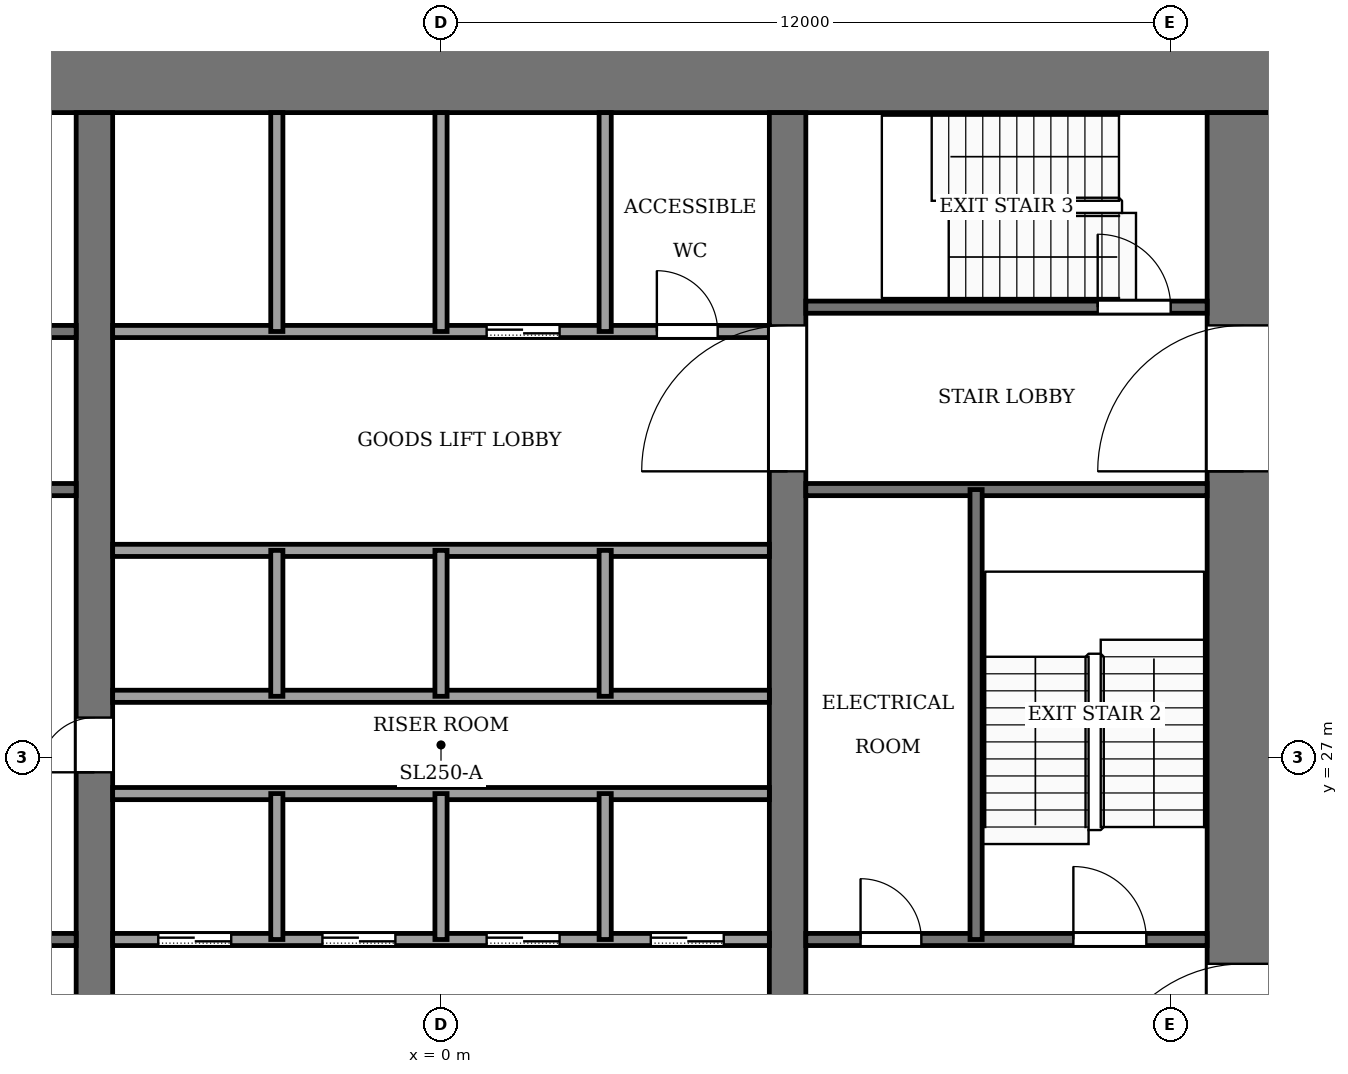
"""IFC4 building model, lengths in metres.
Left out: names, types, materials, properties, quantities, classifications, styles, units other than length and angle.
Written with IfcOpenShell. Run it as: python <this file> out.ifc"""

import sys

from ifc_helpers import new_model, si_unit, direction, frame, frame_2d, origin, place, context, subcontext, project, spatial, rectangle, extrude, element, fill, save


model = new_model("IFC4")
c1 = context("Model", 3, precision=1e-05, world=origin(), true_north=direction((0.0, 1.0)))
c2 = subcontext(c1, "Body", "Model", "MODEL_VIEW")
j1 = project(units=[si_unit("LENGTHUNIT", "METRE"), si_unit("PLANEANGLEUNIT", "RADIAN")], contexts=[c1])
p1 = place(None, origin())
s1 = spatial("IfcSite", under=j1, at=p1, CompositionType="ELEMENT")
p2 = place(p1, origin())
s2 = spatial("IfcBuilding", under=s1, at=p2, CompositionType="ELEMENT")
p3 = place(p2, frame((0.0, 0.0, 82.0)))
s3 = spatial("IfcBuildingStorey", under=s2, at=p3, CompositionType="ELEMENT", Elevation=82.0)
p4 = place(p3, frame((-13.8, 38.2, -0.13), z_axis=(0.0, 0.0, 1.0), x_axis=(1.0, 0.0, 0.0)))
e1 = element("IfcWall", 1, at=p4, inside=s3, PredefinedType="SHEAR", context=c2, shape_type="SweptSolid", body=[
    extrude(rectangle(XDim=27.6, YDim=1.2, at=frame_2d((13.8, 0.0))), origin(), (0.0, 0.0, 1.0), 4.0),
])
p5 = place(p3, frame((13.2, 18.4, -0.13), z_axis=(0.0, 0.0, 1.0), x_axis=(0.0, 1.0, 0.0)))
e2 = element("IfcWall", 2, at=p5, inside=s3, PredefinedType="SHEAR", context=c2, shape_type="SweptSolid", body=[
    extrude(rectangle(XDim=19.2, YDim=1.2, at=frame_2d((9.6, 0.0))), origin(), (0.0, 0.0, 1.0), 4.0),
])
p6 = place(p5, frame((2.8, 0.0, 0.13)))
e3 = element("IfcOpeningElement", 3, at=p6, cuts=e2, PredefinedType="OPENING", context=c2, shape_type="SweptSolid", body=[
    extrude(rectangle(XDim=2.4, YDim=2.4, at=frame_2d((1.2, 1.2))), frame((0.0, 0.61, 0.0), z_axis=(0.0, -1.0, 0.0), x_axis=(1.0, 0.0, 0.0)), (0.0, 0.0, 1.0), 1.22),
])
p7 = place(p5, frame((13.3, 0.0, 0.13)))
e4 = element("IfcOpeningElement", 4, at=p7, cuts=e2, PredefinedType="OPENING", context=c2, shape_type="SweptSolid", body=[
    extrude(rectangle(XDim=2.4, YDim=2.4, at=frame_2d((1.2, 1.2))), frame((0.0, 0.61, 0.0), z_axis=(0.0, -1.0, 0.0), x_axis=(1.0, 0.0, 0.0)), (0.0, 0.0, 1.0), 1.22),
])
p8 = place(p3, frame((-5.7, 18.4, -0.13), z_axis=(0.0, 0.0, 1.0), x_axis=(0.0, 1.0, 0.0)))
e5 = element("IfcWall", 5, at=p8, inside=s3, PredefinedType="SHEAR", context=c2, shape_type="SweptSolid", body=[
    extrude(rectangle(XDim=19.2, YDim=0.6, at=frame_2d((9.6, 0.0))), origin(), (0.0, 0.0, 1.0), 4.0),
])
p9 = place(p8, frame((8.35, 0.0, 0.13)))
e6 = element("IfcOpeningElement", 6, at=p9, cuts=e5, PredefinedType="OPENING", context=c2, shape_type="SweptSolid", body=[
    extrude(rectangle(XDim=0.9, YDim=2.1, at=frame_2d((0.45, 1.05))), frame((0.0, 0.31, 0.0), z_axis=(0.0, -1.0, 0.0), x_axis=(1.0, 0.0, 0.0)), (0.0, 0.0, 1.0), 0.62),
])
p10 = place(p3, frame((5.7, 18.4, -0.13), z_axis=(0.0, 0.0, 1.0), x_axis=(0.0, 1.0, 0.0)))
e7 = element("IfcWall", 7, at=p10, inside=s3, PredefinedType="SHEAR", context=c2, shape_type="SweptSolid", body=[
    extrude(rectangle(XDim=19.2, YDim=0.6, at=frame_2d((9.6, 0.0))), origin(), (0.0, 0.0, 1.0), 4.0),
])
p11 = place(p10, frame((13.3, 0.0, 0.13)))
e8 = element("IfcOpeningElement", 8, at=p11, cuts=e7, PredefinedType="OPENING", context=c2, shape_type="SweptSolid", body=[
    extrude(rectangle(XDim=2.4, YDim=2.4, at=frame_2d((1.2, 1.2))), frame((0.0, 0.31, 0.0), z_axis=(0.0, -1.0, 0.0), x_axis=(1.0, 0.0, 0.0)), (0.0, 0.0, 1.0), 0.62),
])
p12 = place(p3, frame((-12.6, 24.0, 0.0), z_axis=(0.0, 0.0, 1.0), x_axis=(1.0, 0.0, 0.0)))
e9 = element("IfcWall", 9, at=p12, inside=s3, PredefinedType="PARTITIONING", context=c2, shape_type="SweptSolid", body=[
    extrude(rectangle(XDim=6.6, YDim=0.2, at=frame_2d((3.3, 0.0))), origin(), (0.0, 0.0, 1.0), 3.87),
])
p13 = place(p12, frame((4.7, 0.0, 0.0)))
e10 = element("IfcOpeningElement", 10, at=p13, cuts=e9, PredefinedType="OPENING", context=c2, shape_type="SweptSolid", body=[
    extrude(rectangle(XDim=1.0, YDim=2.1, at=frame_2d((0.5, 1.05))), frame((0.0, 0.11, 0.0), z_axis=(0.0, -1.0, 0.0), x_axis=(1.0, 0.0, 0.0)), (0.0, 0.0, 1.0), 0.22),
])
p14 = place(p3, frame((-5.4, 24.0, 0.0), z_axis=(0.0, 0.0, 1.0), x_axis=(1.0, 0.0, 0.0)))
e11 = element("IfcWall", 11, at=p14, inside=s3, PredefinedType="PARTITIONING", context=c2, shape_type="SweptSolid", body=[
    extrude(rectangle(XDim=10.8, YDim=0.2, at=frame_2d((5.4, 0.0))), origin(), (0.0, 0.0, 1.0), 3.87),
])
p15 = place(p14, frame((0.75, 0.0, 0.0)))
e12 = element("IfcOpeningElement", 12, at=p15, cuts=e11, PredefinedType="OPENING", context=c2, shape_type="SweptSolid", body=[
    extrude(rectangle(XDim=1.2, YDim=2.2, at=frame_2d((0.6, 1.1))), frame((0.0, 0.11, 0.0), z_axis=(0.0, -1.0, 0.0), x_axis=(1.0, 0.0, 0.0)), (0.0, 0.0, 1.0), 0.22),
])
p16 = place(p14, frame((3.45, 0.0, 0.0)))
e13 = element("IfcOpeningElement", 13, at=p16, cuts=e11, PredefinedType="OPENING", context=c2, shape_type="SweptSolid", body=[
    extrude(rectangle(XDim=1.2, YDim=2.2, at=frame_2d((0.6, 1.1))), frame((0.0, 0.11, 0.0), z_axis=(0.0, -1.0, 0.0), x_axis=(1.0, 0.0, 0.0)), (0.0, 0.0, 1.0), 0.22),
])
p17 = place(p14, frame((6.15, 0.0, 0.0)))
e14 = element("IfcOpeningElement", 14, at=p17, cuts=e11, PredefinedType="OPENING", context=c2, shape_type="SweptSolid", body=[
    extrude(rectangle(XDim=1.2, YDim=2.2, at=frame_2d((0.6, 1.1))), frame((0.0, 0.11, 0.0), z_axis=(0.0, -1.0, 0.0), x_axis=(1.0, 0.0, 0.0)), (0.0, 0.0, 1.0), 0.22),
])
p18 = place(p14, frame((8.85, 0.0, 0.0)))
e15 = element("IfcOpeningElement", 15, at=p18, cuts=e11, PredefinedType="OPENING", context=c2, shape_type="SweptSolid", body=[
    extrude(rectangle(XDim=1.2, YDim=2.2, at=frame_2d((0.6, 1.1))), frame((0.0, 0.11, 0.0), z_axis=(0.0, -1.0, 0.0), x_axis=(1.0, 0.0, 0.0)), (0.0, 0.0, 1.0), 0.22),
])
p19 = place(p3, frame((6.0, 24.0, 0.0), z_axis=(0.0, 0.0, 1.0), x_axis=(1.0, 0.0, 0.0)))
e16 = element("IfcWall", 16, at=p19, inside=s3, PredefinedType="PARTITIONING", context=c2, shape_type="SweptSolid", body=[
    extrude(rectangle(XDim=6.6, YDim=0.2, at=frame_2d((3.3, 0.0))), origin(), (0.0, 0.0, 1.0), 3.87),
])
p20 = place(p19, frame((0.9, 0.0, 0.0)))
e17 = element("IfcOpeningElement", 17, at=p20, cuts=e16, PredefinedType="OPENING", context=c2, shape_type="SweptSolid", body=[
    extrude(rectangle(XDim=1.0, YDim=2.1, at=frame_2d((0.5, 1.05))), frame((0.0, 0.11, 0.0), z_axis=(0.0, -1.0, 0.0), x_axis=(1.0, 0.0, 0.0)), (0.0, 0.0, 1.0), 0.22),
])
p21 = place(p19, frame((4.4, 0.0, 0.0)))
e18 = element("IfcOpeningElement", 18, at=p21, cuts=e16, PredefinedType="OPENING", context=c2, shape_type="SweptSolid", body=[
    extrude(rectangle(XDim=1.2, YDim=2.2, at=frame_2d((0.6, 1.1))), frame((0.0, 0.11, 0.0), z_axis=(0.0, -1.0, 0.0), x_axis=(1.0, 0.0, 0.0)), (0.0, 0.0, 1.0), 0.22),
])
for number, where, z_axis, x_axis in (
    (19, (-5.4, 26.4, 0.0), (0.0, 0.0, 1.0), (1.0, 0.0, 0.0)),
    (20, (-5.4, 28.0, 0.0), (0.0, 0.0, 1.0), (1.0, 0.0, 0.0)),
    (21, (-5.4, 30.4, 0.0), (0.0, 0.0, 1.0), (1.0, 0.0, 0.0)),
):
    element("IfcWall", number, at=place(p3, frame(where, z_axis=z_axis, x_axis=x_axis)), inside=s3, PredefinedType="PARTITIONING", context=c2, shape_type="SweptSolid", body=[
        extrude(rectangle(XDim=10.8, YDim=0.2, at=frame_2d((5.4, 0.0))), origin(), (0.0, 0.0, 1.0), 3.87),
    ])
p22 = place(p3, frame((-12.6, 31.4, 0.0), z_axis=(0.0, 0.0, 1.0), x_axis=(1.0, 0.0, 0.0)))
e22 = element("IfcWall", 22, at=p22, inside=s3, PredefinedType="PARTITIONING", context=c2, shape_type="SweptSolid", body=[
    extrude(rectangle(XDim=6.6, YDim=0.2, at=frame_2d((3.3, 0.0))), origin(), (0.0, 0.0, 1.0), 3.87),
])
p23 = place(p22, frame((1.0, 0.0, 0.0)))
e23 = element("IfcOpeningElement", 23, at=p23, cuts=e22, PredefinedType="OPENING", context=c2, shape_type="SweptSolid", body=[
    extrude(rectangle(XDim=1.2, YDim=2.2, at=frame_2d((0.6, 1.1))), frame((0.0, 0.11, 0.0), z_axis=(0.0, -1.0, 0.0), x_axis=(1.0, 0.0, 0.0)), (0.0, 0.0, 1.0), 0.22),
])
p24 = place(p3, frame((6.0, 31.4, 0.0), z_axis=(0.0, 0.0, 1.0), x_axis=(1.0, 0.0, 0.0)))
e24 = element("IfcWall", 24, at=p24, inside=s3, PredefinedType="PARTITIONING", context=c2, shape_type="SweptSolid", body=[
    extrude(rectangle(XDim=6.6, YDim=0.2, at=frame_2d((3.3, 0.0))), origin(), (0.0, 0.0, 1.0), 3.87),
])
p25 = place(p3, frame((-12.6, 34.0, 0.0), z_axis=(0.0, 0.0, 1.0), x_axis=(1.0, 0.0, 0.0)))
e25 = element("IfcWall", 25, at=p25, inside=s3, PredefinedType="PARTITIONING", context=c2, shape_type="SweptSolid", body=[
    extrude(rectangle(XDim=6.6, YDim=0.2, at=frame_2d((3.3, 0.0))), origin(), (0.0, 0.0, 1.0), 3.87),
])
p26 = place(p25, frame((4.7, 0.0, 0.0)))
e26 = element("IfcOpeningElement", 26, at=p26, cuts=e25, PredefinedType="OPENING", context=c2, shape_type="SweptSolid", body=[
    extrude(rectangle(XDim=1.4, YDim=2.2, at=frame_2d((0.7, 1.1))), frame((0.0, 0.11, 0.0), z_axis=(0.0, -1.0, 0.0), x_axis=(1.0, 0.0, 0.0)), (0.0, 0.0, 1.0), 0.22),
])
p27 = place(p25, frame((2.3, 0.0, 0.0)))
e27 = element("IfcOpeningElement", 27, at=p27, cuts=e25, PredefinedType="OPENING", context=c2, shape_type="SweptSolid", body=[
    extrude(rectangle(XDim=1.4, YDim=2.2, at=frame_2d((0.7, 1.1))), frame((0.0, 0.11, 0.0), z_axis=(0.0, -1.0, 0.0), x_axis=(1.0, 0.0, 0.0)), (0.0, 0.0, 1.0), 0.22),
])
p28 = place(p25, frame((0.45, 0.0, 0.0)))
e28 = element("IfcOpeningElement", 28, at=p28, cuts=e25, PredefinedType="OPENING", context=c2, shape_type="SweptSolid", body=[
    extrude(rectangle(XDim=0.9, YDim=2.1, at=frame_2d((0.45, 1.05))), frame((0.0, 0.11, 0.0), z_axis=(0.0, -1.0, 0.0), x_axis=(1.0, 0.0, 0.0)), (0.0, 0.0, 1.0), 0.22),
])
p29 = place(p3, frame((-5.4, 34.0, 0.0), z_axis=(0.0, 0.0, 1.0), x_axis=(1.0, 0.0, 0.0)))
e29 = element("IfcWall", 29, at=p29, inside=s3, PredefinedType="PARTITIONING", context=c2, shape_type="SweptSolid", body=[
    extrude(rectangle(XDim=10.8, YDim=0.2, at=frame_2d((5.4, 0.0))), origin(), (0.0, 0.0, 1.0), 3.87),
])
p30 = place(p29, frame((6.15, 0.0, 0.0)))
e30 = element("IfcOpeningElement", 30, at=p30, cuts=e29, PredefinedType="OPENING", context=c2, shape_type="SweptSolid", body=[
    extrude(rectangle(XDim=1.2, YDim=2.2, at=frame_2d((0.6, 1.1))), frame((0.0, 0.11, 0.0), z_axis=(0.0, -1.0, 0.0), x_axis=(1.0, 0.0, 0.0)), (0.0, 0.0, 1.0), 0.22),
])
p31 = place(p29, frame((8.95, 0.0, 0.0)))
e31 = element("IfcOpeningElement", 31, at=p31, cuts=e29, PredefinedType="OPENING", context=c2, shape_type="SweptSolid", body=[
    extrude(rectangle(XDim=1.0, YDim=2.1, at=frame_2d((0.5, 1.05))), frame((0.0, 0.11, 0.0), z_axis=(0.0, -1.0, 0.0), x_axis=(1.0, 0.0, 0.0)), (0.0, 0.0, 1.0), 0.22),
])
p32 = place(p3, frame((6.0, 34.4, 0.0), z_axis=(0.0, 0.0, 1.0), x_axis=(1.0, 0.0, 0.0)))
e32 = element("IfcWall", 32, at=p32, inside=s3, PredefinedType="PARTITIONING", context=c2, shape_type="SweptSolid", body=[
    extrude(rectangle(XDim=6.6, YDim=0.2, at=frame_2d((3.3, 0.0))), origin(), (0.0, 0.0, 1.0), 3.87),
])
p33 = place(p32, frame((4.8, 0.0, 0.0)))
e33 = element("IfcOpeningElement", 33, at=p33, cuts=e32, PredefinedType="OPENING", context=c2, shape_type="SweptSolid", body=[
    extrude(rectangle(XDim=1.2, YDim=2.2, at=frame_2d((0.6, 1.1))), frame((0.0, 0.11, 0.0), z_axis=(0.0, -1.0, 0.0), x_axis=(1.0, 0.0, 0.0)), (0.0, 0.0, 1.0), 0.22),
])
for number, where, z_axis, x_axis in (
    (34, (-2.7, 24.0, 0.0), (0.0, 0.0, 1.0), (0.0, 1.0, 0.0)),
    (35, (-2.7, 28.0, 0.0), (0.0, 0.0, 1.0), (0.0, 1.0, 0.0)),
):
    element("IfcWall", number, at=place(p3, frame(where, z_axis=z_axis, x_axis=x_axis)), inside=s3, PredefinedType="PARTITIONING", context=c2, shape_type="SweptSolid", body=[
        extrude(rectangle(XDim=2.4, YDim=0.2, at=frame_2d((1.2, 0.0))), origin(), (0.0, 0.0, 1.0), 3.87),
    ])
p34 = place(p3, frame((-2.7, 34.0, 0.0), z_axis=(0.0, 0.0, 1.0), x_axis=(0.0, 1.0, 0.0)))
e36 = element("IfcWall", 36, at=p34, inside=s3, PredefinedType="PARTITIONING", context=c2, shape_type="SweptSolid", body=[
    extrude(rectangle(XDim=3.6, YDim=0.2, at=frame_2d((1.8, 0.0))), origin(), (0.0, 0.0, 1.0), 3.87),
])
for number, where, z_axis, x_axis in (
    (37, (0.0, 24.0, 0.0), (0.0, 0.0, 1.0), (0.0, 1.0, 0.0)),
    (38, (0.0, 28.0, 0.0), (0.0, 0.0, 1.0), (0.0, 1.0, 0.0)),
):
    element("IfcWall", number, at=place(p3, frame(where, z_axis=z_axis, x_axis=x_axis)), inside=s3, PredefinedType="PARTITIONING", context=c2, shape_type="SweptSolid", body=[
        extrude(rectangle(XDim=2.4, YDim=0.2, at=frame_2d((1.2, 0.0))), origin(), (0.0, 0.0, 1.0), 3.87),
    ])
p35 = place(p3, frame((0.0, 34.0, 0.0), z_axis=(0.0, 0.0, 1.0), x_axis=(0.0, 1.0, 0.0)))
e39 = element("IfcWall", 39, at=p35, inside=s3, PredefinedType="PARTITIONING", context=c2, shape_type="SweptSolid", body=[
    extrude(rectangle(XDim=3.6, YDim=0.2, at=frame_2d((1.8, 0.0))), origin(), (0.0, 0.0, 1.0), 3.87),
])
for number, where, z_axis, x_axis in (
    (40, (2.7, 24.0, 0.0), (0.0, 0.0, 1.0), (0.0, 1.0, 0.0)),
    (41, (2.7, 28.0, 0.0), (0.0, 0.0, 1.0), (0.0, 1.0, 0.0)),
):
    element("IfcWall", number, at=place(p3, frame(where, z_axis=z_axis, x_axis=x_axis)), inside=s3, PredefinedType="PARTITIONING", context=c2, shape_type="SweptSolid", body=[
        extrude(rectangle(XDim=2.4, YDim=0.2, at=frame_2d((1.2, 0.0))), origin(), (0.0, 0.0, 1.0), 3.87),
    ])
p36 = place(p3, frame((2.7, 34.0, 0.0), z_axis=(0.0, 0.0, 1.0), x_axis=(0.0, 1.0, 0.0)))
e42 = element("IfcWall", 42, at=p36, inside=s3, PredefinedType="PARTITIONING", context=c2, shape_type="SweptSolid", body=[
    extrude(rectangle(XDim=3.6, YDim=0.2, at=frame_2d((1.8, 0.0))), origin(), (0.0, 0.0, 1.0), 3.87),
])
p37 = place(p3, frame((8.8, 24.0, 0.0), z_axis=(0.0, 0.0, 1.0), x_axis=(0.0, 1.0, 0.0)))
e43 = element("IfcWall", 43, at=p37, inside=s3, PredefinedType="PARTITIONING", context=c2, shape_type="SweptSolid", body=[
    extrude(rectangle(XDim=7.4, YDim=0.2, at=frame_2d((3.7, 0.0))), origin(), (0.0, 0.0, 1.0), 3.87),
])
p38 = place(p15, origin())
e44 = element("IfcDoor", 44, at=p38, inside=s3, OperationType="SLIDING_TO_LEFT", PredefinedType="DOOR", context=c2, shape_type="SweptSolid", body=[
    extrude(rectangle(XDim=1.2, YDim=2.2, at=frame_2d((0.6, 1.1))), frame((0.0, 0.025, 0.0), z_axis=(0.0, -1.0, 0.0), x_axis=(1.0, 0.0, 0.0)), (0.0, 0.0, 1.0), 0.05),
])
fill(e12, e44)
p39 = place(p16, origin())
e45 = element("IfcDoor", 45, at=p39, inside=s3, OperationType="SLIDING_TO_LEFT", PredefinedType="DOOR", context=c2, shape_type="SweptSolid", body=[
    extrude(rectangle(XDim=1.2, YDim=2.2, at=frame_2d((0.6, 1.1))), frame((0.0, 0.025, 0.0), z_axis=(0.0, -1.0, 0.0), x_axis=(1.0, 0.0, 0.0)), (0.0, 0.0, 1.0), 0.05),
])
fill(e13, e45)
p40 = place(p17, origin())
e46 = element("IfcDoor", 46, at=p40, inside=s3, OperationType="SLIDING_TO_LEFT", PredefinedType="DOOR", context=c2, shape_type="SweptSolid", body=[
    extrude(rectangle(XDim=1.2, YDim=2.2, at=frame_2d((0.6, 1.1))), frame((0.0, 0.025, 0.0), z_axis=(0.0, -1.0, 0.0), x_axis=(1.0, 0.0, 0.0)), (0.0, 0.0, 1.0), 0.05),
])
fill(e14, e46)
p41 = place(p18, origin())
e47 = element("IfcDoor", 47, at=p41, inside=s3, OperationType="SLIDING_TO_LEFT", PredefinedType="DOOR", context=c2, shape_type="SweptSolid", body=[
    extrude(rectangle(XDim=1.2, YDim=2.2, at=frame_2d((0.6, 1.1))), frame((0.0, 0.025, 0.0), z_axis=(0.0, -1.0, 0.0), x_axis=(1.0, 0.0, 0.0)), (0.0, 0.0, 1.0), 0.05),
])
fill(e15, e47)
p42 = place(p30, origin())
e48 = element("IfcDoor", 48, at=p42, inside=s3, OperationType="SLIDING_TO_LEFT", PredefinedType="DOOR", context=c2, shape_type="SweptSolid", body=[
    extrude(rectangle(XDim=1.2, YDim=2.2, at=frame_2d((0.6, 1.1))), frame((0.0, 0.025, 0.0), z_axis=(0.0, -1.0, 0.0), x_axis=(1.0, 0.0, 0.0)), (0.0, 0.0, 1.0), 0.05),
])
fill(e30, e48)
p43 = place(p20, origin())
e49 = element("IfcDoor", 49, at=p43, inside=s3, OperationType="SINGLE_SWING_LEFT", PredefinedType="DOOR", context=c2, shape_type="SweptSolid", body=[
    extrude(rectangle(XDim=1.0, YDim=2.1, at=frame_2d((0.5, 1.05))), frame((0.0, 0.025, 0.0), z_axis=(0.0, -1.0, 0.0), x_axis=(1.0, 0.0, 0.0)), (0.0, 0.0, 1.0), 0.05),
])
fill(e17, e49)
p44 = place(p31, origin())
e50 = element("IfcDoor", 50, at=p44, inside=s3, OperationType="SINGLE_SWING_LEFT", PredefinedType="DOOR", context=c2, shape_type="SweptSolid", body=[
    extrude(rectangle(XDim=1.0, YDim=2.1, at=frame_2d((0.5, 1.05))), frame((0.0, 0.025, 0.0), z_axis=(0.0, -1.0, 0.0), x_axis=(1.0, 0.0, 0.0)), (0.0, 0.0, 1.0), 0.05),
])
fill(e31, e50)
p45 = place(p9, origin())
e51 = element("IfcDoor", 51, at=p45, inside=s3, OperationType="SINGLE_SWING_RIGHT", PredefinedType="DOOR", context=c2, shape_type="SweptSolid", body=[
    extrude(rectangle(XDim=0.9, YDim=2.1, at=frame_2d((0.45, 1.05))), frame((0.0, 0.025, 0.0), z_axis=(0.0, -1.0, 0.0), x_axis=(1.0, 0.0, 0.0)), (0.0, 0.0, 1.0), 0.05),
])
fill(e6, e51)
p46 = place(p21, origin())
e52 = element("IfcDoor", 52, at=p46, inside=s3, OperationType="SINGLE_SWING_LEFT", PredefinedType="DOOR", context=c2, shape_type="SweptSolid", body=[
    extrude(rectangle(XDim=1.2, YDim=2.2, at=frame_2d((0.6, 1.1))), frame((0.0, 0.025, 0.0), z_axis=(0.0, -1.0, 0.0), x_axis=(1.0, 0.0, 0.0)), (0.0, 0.0, 1.0), 0.05),
])
fill(e18, e52)
p47 = place(p33, origin())
e53 = element("IfcDoor", 53, at=p47, inside=s3, OperationType="SINGLE_SWING_RIGHT", PredefinedType="DOOR", context=c2, shape_type="SweptSolid", body=[
    extrude(rectangle(XDim=1.2, YDim=2.2, at=frame_2d((0.6, 1.1))), frame((0.0, 0.025, 0.0), z_axis=(0.0, -1.0, 0.0), x_axis=(1.0, 0.0, 0.0)), (0.0, 0.0, 1.0), 0.05),
])
fill(e33, e53)
p48 = place(p11, origin())
e54 = element("IfcDoor", 54, at=p48, inside=s3, OperationType="DOUBLE_DOOR_SINGLE_SWING", PredefinedType="DOOR", context=c2, shape_type="SweptSolid", body=[
    extrude(rectangle(XDim=2.4, YDim=2.4, at=frame_2d((1.2, 1.2))), frame((0.0, 0.025, 0.0), z_axis=(0.0, -1.0, 0.0), x_axis=(1.0, 0.0, 0.0)), (0.0, 0.0, 1.0), 0.05),
])
fill(e8, e54)
p49 = place(p6, origin())
e55 = element("IfcDoor", 55, at=p49, inside=s3, OperationType="DOUBLE_DOOR_SINGLE_SWING", PredefinedType="DOOR", context=c2, shape_type="SweptSolid", body=[
    extrude(rectangle(XDim=2.4, YDim=2.4, at=frame_2d((1.2, 1.2))), frame((0.0, 0.025, 0.0), z_axis=(0.0, -1.0, 0.0), x_axis=(1.0, 0.0, 0.0)), (0.0, 0.0, 1.0), 0.05),
])
fill(e3, e55)
p50 = place(p7, origin())
e56 = element("IfcDoor", 56, at=p50, inside=s3, OperationType="DOUBLE_DOOR_SINGLE_SWING", PredefinedType="DOOR", context=c2, shape_type="SweptSolid", body=[
    extrude(rectangle(XDim=2.4, YDim=2.4, at=frame_2d((1.2, 1.2))), frame((0.0, 0.025, 0.0), z_axis=(0.0, -1.0, 0.0), x_axis=(1.0, 0.0, 0.0)), (0.0, 0.0, 1.0), 0.05),
])
fill(e4, e56)
save(model, sys.argv[1])
